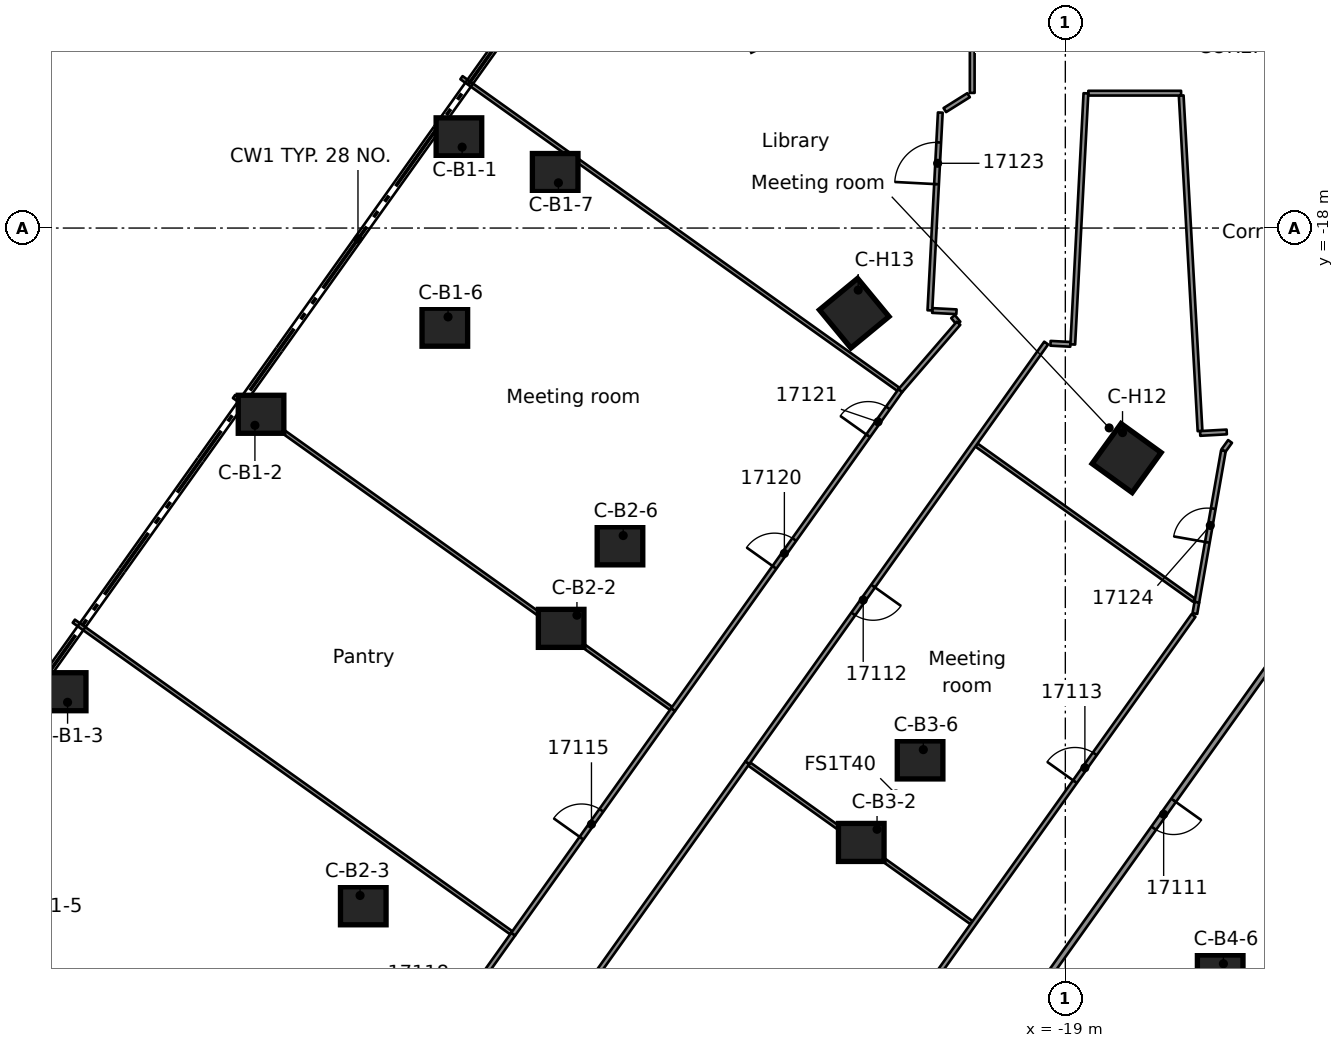
"""IFC4 building model, lengths in metres.
Left out: names, types, materials, properties, quantities, classifications, styles, units other than length and angle.
Written with IfcOpenShell. Run it as: python <this file> out.ifc"""

import sys

from ifc_helpers import new_model, si_unit, direction, frame, frame_2d, origin, origin_2d, place, context, subcontext, project, spatial, rectangle, extrude, element, fill, save


model = new_model("IFC4")
c1 = context("Model", 3, precision=1e-05, world=origin(), true_north=direction((0.0, 1.0)))
c2 = subcontext(c1, "Body", "Model", "MODEL_VIEW")
j1 = project(units=[si_unit("LENGTHUNIT", "METRE"), si_unit("PLANEANGLEUNIT", "RADIAN")], contexts=[c1])
p1 = place(None, origin())
s1 = spatial("IfcSite", under=j1, at=p1, CompositionType="ELEMENT")
p2 = place(p1, origin())
s2 = spatial("IfcBuilding", under=s1, at=p2, CompositionType="ELEMENT")
p3 = place(p2, frame((0.0, 0.0, 84.2)))
s3 = spatial("IfcBuildingStorey", under=s2, at=p3, CompositionType="ELEMENT", Elevation=84.2)
for number, where, z_axis, x_axis in (
    (1, (-34.957, -15.6, 0.0), (0.0, 0.0, 1.0), (1.0, 0.0, 0.0)),
    (2, (-40.164, -22.9, 0.0), (0.0, 0.0, 1.0), (1.0, 0.0, 0.0)),
    (3, (-45.371, -30.2, 0.0), (0.0, 0.0, 1.0), (1.0, 0.0, 0.0)),
    (4, (-35.328, -20.609, 0.0), (0.0, 0.0, 1.0), (1.0, 0.0, 0.0)),
    (5, (-32.424, -16.539, 0.0), (0.0, 0.0, 1.0), (1.0, 0.0, 0.0)),
    (6, (-32.267, -28.533, 0.0), (0.0, 0.0, 1.0), (1.0, 0.0, 0.0)),
    (7, (-37.474, -35.833, 0.0), (0.0, 0.0, 1.0), (1.0, 0.0, 0.0)),
    (8, (-30.719, -26.362, 0.0), (0.0, 0.0, 1.0), (1.0, 0.0, 0.0)),
    (9, (-24.37, -34.166, 0.0), (0.0, 0.0, 1.0), (1.0, 0.0, 0.0)),
    (10, (-22.822, -31.995, 0.0), (0.0, 0.0, 1.0), (1.0, 0.0, 0.0)),
    (11, (-14.925, -37.628, 0.0), (0.0, 0.0, 1.0), (1.0, 0.0, 0.0)),
):
    element("IfcColumn", number, at=place(p3, frame(where, z_axis=z_axis, x_axis=x_axis)), inside=s3, PredefinedType="COLUMN", context=c2, shape_type="SweptSolid", body=[
        extrude(rectangle(XDim=1.2, YDim=1.0, at=origin_2d()), origin(), (0.0, 0.0, 1.0), 3.5),
    ])
for number, where, z_axis, x_axis in (
    (12, (-17.387, -24.053, 0.0), (0.0, 0.0, 1.0), (-0.586, -0.81, 0.0)),
    (13, (-24.555, -20.241, 0.0), (0.0, 0.0, 1.0), (-0.772, -0.636, 0.0)),
):
    element("IfcColumn", number, at=place(p3, frame(where, z_axis=z_axis, x_axis=x_axis)), inside=s3, PredefinedType="COLUMN", context=c2, shape_type="SweptSolid", body=[
        extrude(rectangle(XDim=1.3, YDim=1.3, at=origin_2d()), origin(), (0.0, 0.0, 1.0), 3.5),
    ])
p4 = place(p3, frame((-15.455, -23.341, 0.0), z_axis=(0.0, 0.0, 1.0), x_axis=(-0.056078648391, 0.998426354417, 0.0)))
e14 = element("IfcWall", 14, at=p4, inside=s3, PredefinedType="PARTITIONING", context=c2, shape_type="SweptSolid", body=[
    extrude(rectangle(XDim=8.842, YDim=0.125, at=frame_2d((4.421, 0.0))), origin(), (0.0, 0.0, 1.0), 3.08),
])
p5 = place(p3, frame((-21.955, -20.33, 0.0), z_axis=(0.0, 0.0, 1.0), x_axis=(0.635933908165, -0.771743522451, 0.0)))
e15 = element("IfcWall", 15, at=p5, inside=s3, PredefinedType="PARTITIONING", context=c2, shape_type="SweptSolid", body=[
    extrude(rectangle(XDim=0.227, YDim=0.125, at=frame_2d((0.113, 0.0))), origin(), (0.0, 0.0, 1.0), 3.08),
])
p6 = place(p3, frame((-45.091, -28.344, 0.0), z_axis=(0.0, 0.0, 1.0), x_axis=(0.814507796702, -0.580152608468, 0.0)))
e16 = element("IfcWall", 16, at=p6, inside=s3, PredefinedType="PARTITIONING", context=c2, shape_type="SweptSolid", body=[
    extrude(rectangle(XDim=14.132, YDim=0.1, at=frame_2d((7.066, 0.0))), origin(), (0.0, 0.0, 1.0), 3.08),
])
p7 = place(p3, frame((-40.875, -22.433, 0.0), z_axis=(0.0, 0.0, 1.0), x_axis=(0.814073113892, -0.580762399987, 0.0)))
e17 = element("IfcWall", 17, at=p7, inside=s3, PredefinedType="PARTITIONING", context=c2, shape_type="SweptSolid", body=[
    extrude(rectangle(XDim=14.128, YDim=0.1, at=frame_2d((7.064, 0.0))), origin(), (0.0, 0.0, 1.0), 3.08),
])
p8 = place(p3, frame((-27.317, -32.104, 0.0), z_axis=(0.0, 0.0, 1.0), x_axis=(0.814075490276, -0.58075906892, 0.0)))
e18 = element("IfcWall", 18, at=p8, inside=s3, PredefinedType="PARTITIONING", context=c2, shape_type="SweptSolid", body=[
    extrude(rectangle(XDim=7.184, YDim=0.1, at=frame_2d((3.592, 0.0))), origin(), (0.0, 0.0, 1.0), 3.08),
])
p9 = place(p3, frame((-34.89, -14.043, 0.0), z_axis=(0.0, 0.0, 1.0), x_axis=(0.814114134431, -0.580704895898, 0.0)))
e19 = element("IfcWall", 19, at=p9, inside=s3, PredefinedType="PARTITIONING", context=c2, shape_type="SweptSolid", body=[
    extrude(rectangle(XDim=14.121, YDim=0.1, at=frame_2d((7.06, 0.0))), origin(), (0.0, 0.0, 1.0), 3.08),
])
p10 = place(p3, frame((-21.338, -23.709, 0.0), z_axis=(0.0, 0.0, 1.0), x_axis=(0.814120490143, -0.580695985461, 0.0)))
e20 = element("IfcWall", 20, at=p10, inside=s3, PredefinedType="PARTITIONING", context=c2, shape_type="SweptSolid", body=[
    extrude(rectangle(XDim=7.03, YDim=0.1, at=frame_2d((3.515, 0.0))), origin(), (0.0, 0.0, 1.0), 3.08),
])
p11 = place(p3, frame((-19.39, -21.032, 0.0), z_axis=(0.0, 0.0, 1.0), x_axis=(0.998561899865, -0.053610932999, 0.0)))
e21 = element("IfcWall", 21, at=p11, inside=s3, PredefinedType="PARTITIONING", context=c2, shape_type="SweptSolid", body=[
    extrude(rectangle(XDim=0.524, YDim=0.125, at=frame_2d((0.262, 0.0))), origin(), (0.0, 0.0, 1.0), 3.08),
])
p12 = place(p3, frame((-22.501, -20.169, 0.0), z_axis=(0.0, 0.0, 1.0), x_axis=(0.998579445261, -0.05328312587, 0.0)))
e22 = element("IfcWall", 22, at=p12, inside=s3, PredefinedType="PARTITIONING", context=c2, shape_type="SweptSolid", body=[
    extrude(rectangle(XDim=0.637, YDim=0.125, at=frame_2d((0.318, 0.0))), origin(), (0.0, 0.0, 1.0), 3.08),
])
p13 = place(p3, frame((-18.395, -14.451, 0.0), z_axis=(0.0, 0.0, 1.0), x_axis=(1.0, 0.0, 0.0)))
e23 = element("IfcWall", 23, at=p13, inside=s3, PredefinedType="PARTITIONING", context=c2, shape_type="SweptSolid", body=[
    extrude(rectangle(XDim=2.441, YDim=0.125, at=frame_2d((1.22, 0.0))), origin(), (0.0, 0.0, 1.0), 3.08),
])
p14 = place(p3, frame((-15.452, -23.404, 0.0), z_axis=(0.0, 0.0, 1.0), x_axis=(0.99844205744, 0.055798368561, 0.0)))
e24 = element("IfcWall", 24, at=p14, inside=s3, PredefinedType="PARTITIONING", context=c2, shape_type="SweptSolid", body=[
    extrude(rectangle(XDim=0.7, YDim=0.125, at=frame_2d((0.35, 0.0))), origin(), (0.0, 0.0, 1.0), 3.08),
])
p15 = place(p3, frame((-22.171, -14.896, 0.0), z_axis=(0.0, 0.0, 1.0), x_axis=(0.847104786715, 0.53142589354, 0.0)))
e25 = element("IfcWall", 25, at=p15, inside=s3, PredefinedType="PARTITIONING", context=c2, shape_type="SweptSolid", body=[
    extrude(rectangle(XDim=0.738, YDim=0.125, at=frame_2d((0.369, 0.0))), origin(), (0.0, 0.0, 1.0), 3.08),
])
p16 = place(p3, frame((-21.811, -20.505, 0.0), z_axis=(0.0, 0.0, 1.0), x_axis=(-0.65355749983, -0.756876868728, 0.0)))
e26 = element("IfcWall", 26, at=p16, inside=s3, PredefinedType="PARTITIONING", context=c2, shape_type="SweptSolid", body=[
    extrude(rectangle(XDim=2.344, YDim=0.125, at=frame_2d((1.172, 0.0))), origin(), (0.0, 0.0, 1.0), 3.08),
])
p17 = place(p3, frame((-14.84, -23.857, 0.0), z_axis=(0.0, 0.0, 1.0), x_axis=(0.586176879317, 0.810183106559, 0.0)))
e27 = element("IfcWall", 27, at=p17, inside=s3, PredefinedType="PARTITIONING", context=c2, shape_type="SweptSolid", body=[
    extrude(rectangle(XDim=0.299, YDim=0.125, at=frame_2d((0.149, 0.0))), origin(), (0.0, 0.0, 1.0), 3.08),
])
p18 = place(p3, frame((-13.48, -29.312, 0.0), z_axis=(0.0, 0.0, 1.0), x_axis=(-0.580603145907, -0.814186702767, 0.0)))
e28 = element("IfcWall", 28, at=p18, inside=s3, PredefinedType="PARTITIONING", context=c2, shape_type="SweptSolid", body=[
    extrude(rectangle(XDim=24.809, YDim=0.15, at=frame_2d((12.404, 0.0))), origin(), (0.0, 0.0, 1.0), 3.08),
])
p19 = place(p18, frame((4.601, 0.0, 0.0)))
e29 = element("IfcOpeningElement", 29, at=p19, cuts=e28, PredefinedType="OPENING", context=c2, shape_type="SweptSolid", body=[
    extrude(rectangle(XDim=0.9, YDim=2.1, at=frame_2d((0.45, 1.05))), frame((0.0, 0.085, 0.0), z_axis=(0.0, -1.0, 0.0), x_axis=(1.0, 0.0, 0.0)), (0.0, 0.0, 1.0), 0.17),
])
p20 = place(p18, frame((13.408, 0.0, 0.0)))
e30 = element("IfcOpeningElement", 30, at=p20, cuts=e28, PredefinedType="OPENING", context=c2, shape_type="SweptSolid", body=[
    extrude(rectangle(XDim=0.9, YDim=2.1, at=frame_2d((0.45, 1.05))), frame((0.0, 0.085, 0.0), z_axis=(0.0, -1.0, 0.0), x_axis=(1.0, 0.0, 0.0)), (0.0, 0.0, 1.0), 0.17),
])
p21 = place(p18, frame((19.4, 0.0, 0.0)))
e31 = element("IfcOpeningElement", 31, at=p21, cuts=e28, PredefinedType="OPENING", context=c2, shape_type="SweptSolid", body=[
    extrude(rectangle(XDim=0.9, YDim=2.1, at=frame_2d((0.45, 1.05))), frame((0.0, 0.085, 0.0), z_axis=(0.0, -1.0, 0.0), x_axis=(1.0, 0.0, 0.0)), (0.0, 0.0, 1.0), 0.17),
])
p22 = place(p3, frame((-28.27, -45.918, 0.0), z_axis=(0.0, 0.0, 1.0), x_axis=(0.580725722128, 0.814099278749, 0.0)))
e32 = element("IfcWall", 32, at=p22, inside=s3, PredefinedType="PARTITIONING", context=c2, shape_type="SweptSolid", body=[
    extrude(rectangle(XDim=21.771, YDim=0.125, at=frame_2d((10.886, 0.0))), origin(), (0.0, 0.0, 1.0), 3.08),
])
p23 = place(p22, frame((16.399, 0.0, 0.0)))
e33 = element("IfcOpeningElement", 33, at=p23, cuts=e32, PredefinedType="OPENING", context=c2, shape_type="SweptSolid", body=[
    extrude(rectangle(XDim=0.9, YDim=2.1, at=frame_2d((0.45, 1.05))), frame((0.0, 0.073, 0.0), z_axis=(0.0, -1.0, 0.0), x_axis=(1.0, 0.0, 0.0)), (0.0, 0.0, 1.0), 0.145),
])
p24 = place(p22, frame((5.35, 0.0, 0.0)))
e34 = element("IfcOpeningElement", 34, at=p24, cuts=e32, PredefinedType="OPENING", context=c2, shape_type="SweptSolid", body=[
    extrude(rectangle(XDim=0.9, YDim=2.1, at=frame_2d((0.45, 1.05))), frame((0.0, 0.073, 0.0), z_axis=(0.0, -1.0, 0.0), x_axis=(1.0, 0.0, 0.0)), (0.0, 0.0, 1.0), 0.145),
])
p25 = place(p3, frame((-34.214, -41.679, 0.0), z_axis=(0.0, 0.0, 1.0), x_axis=(0.580188672361, 0.81448210813, 0.0)))
e35 = element("IfcWall", 35, at=p25, inside=s3, PredefinedType="PARTITIONING", context=c2, shape_type="SweptSolid", body=[
    extrude(rectangle(XDim=11.8, YDim=0.125, at=frame_2d((5.9, 0.0))), origin(), (0.0, 0.0, 1.0), 3.08),
])
p26 = place(p3, frame((-19.504, -21.026, 0.0), z_axis=(0.0, 0.0, 1.0), x_axis=(-0.580099628217, -0.814545530552, 0.0)))
e36 = element("IfcWall", 36, at=p26, inside=s3, PredefinedType="PARTITIONING", context=c2, shape_type="SweptSolid", body=[
    extrude(rectangle(XDim=13.556, YDim=0.125, at=frame_2d((6.778, 0.0))), origin(), (0.0, 0.0, 1.0), 3.08),
])
p27 = place(p26, frame((7.85, 0.0, 0.0)))
e37 = element("IfcOpeningElement", 37, at=p27, cuts=e36, PredefinedType="OPENING", context=c2, shape_type="SweptSolid", body=[
    extrude(rectangle(XDim=0.9, YDim=2.1, at=frame_2d((0.45, 1.05))), frame((0.0, 0.073, 0.0), z_axis=(0.0, -1.0, 0.0), x_axis=(1.0, 0.0, 0.0)), (0.0, 0.0, 1.0), 0.145),
])
p28 = place(p3, frame((-37.736, -42.485, 0.0), z_axis=(0.0, 0.0, 1.0), x_axis=(0.580183503548, 0.814485790061, 0.0)))
e38 = element("IfcWall", 38, at=p28, inside=s3, PredefinedType="PARTITIONING", context=c2, shape_type="SweptSolid", body=[
    extrude(rectangle(XDim=7.251, YDim=0.125, at=frame_2d((3.625, 0.0))), origin(), (0.0, 0.0, 1.0), 3.08),
])
p29 = place(p28, frame((3.1, 0.0, 0.0)))
e39 = element("IfcOpeningElement", 39, at=p29, cuts=e38, PredefinedType="OPENING", context=c2, shape_type="SweptSolid", body=[
    extrude(rectangle(XDim=0.9, YDim=2.1, at=frame_2d((0.45, 1.05))), frame((0.0, 0.073, 0.0), z_axis=(0.0, -1.0, 0.0), x_axis=(1.0, 0.0, 0.0)), (0.0, 0.0, 1.0), 0.145),
])
p30 = place(p3, frame((-29.323, -30.674, 0.0), z_axis=(0.0, 0.0, 1.0), x_axis=(0.580180127153, 0.814488195161, 0.0)))
e40 = element("IfcWall", 40, at=p30, inside=s3, PredefinedType="PARTITIONING", context=c2, shape_type="SweptSolid", body=[
    extrude(rectangle(XDim=10.307, YDim=0.125, at=frame_2d((5.154, 0.0))), origin(), (0.0, 0.0, 1.0), 3.08),
])
p31 = place(p30, frame((4.6, 0.0, 0.0)))
e41 = element("IfcOpeningElement", 41, at=p31, cuts=e40, PredefinedType="OPENING", context=c2, shape_type="SweptSolid", body=[
    extrude(rectangle(XDim=0.9, YDim=2.1, at=frame_2d((0.45, 1.05))), frame((0.0, 0.073, 0.0), z_axis=(0.0, -1.0, 0.0), x_axis=(1.0, 0.0, 0.0)), (0.0, 0.0, 1.0), 0.145),
])
p32 = place(p30, frame((8.85, 0.0, 0.0)))
e42 = element("IfcOpeningElement", 42, at=p32, cuts=e40, PredefinedType="OPENING", context=c2, shape_type="SweptSolid", body=[
    extrude(rectangle(XDim=0.9, YDim=2.1, at=frame_2d((0.45, 1.05))), frame((0.0, 0.073, 0.0), z_axis=(0.0, -1.0, 0.0), x_axis=(1.0, 0.0, 0.0)), (0.0, 0.0, 1.0), 0.145),
])
p33 = place(p3, frame((-33.529, -36.579, 0.0), z_axis=(0.0, 0.0, 1.0), x_axis=(0.580157797449, 0.814504100702, 0.0)))
e43 = element("IfcWall", 43, at=p33, inside=s3, PredefinedType="PARTITIONING", context=c2, shape_type="SweptSolid", body=[
    extrude(rectangle(XDim=7.25, YDim=0.125, at=frame_2d((3.625, 0.0))), origin(), (0.0, 0.0, 1.0), 3.08),
])
p34 = place(p33, frame((3.1, 0.0, 0.0)))
e44 = element("IfcOpeningElement", 44, at=p34, cuts=e43, PredefinedType="OPENING", context=c2, shape_type="SweptSolid", body=[
    extrude(rectangle(XDim=0.9, YDim=2.1, at=frame_2d((0.45, 1.05))), frame((0.0, 0.073, 0.0), z_axis=(0.0, -1.0, 0.0), x_axis=(1.0, 0.0, 0.0)), (0.0, 0.0, 1.0), 0.145),
])
p35 = place(p3, frame((-15.539, -27.845, 0.0), z_axis=(0.0, 0.0, 1.0), x_axis=(0.172636295387, 0.984985639243, 0.0)))
e45 = element("IfcWall", 45, at=p35, inside=s3, PredefinedType="PARTITIONING", context=c2, shape_type="SweptSolid", body=[
    extrude(rectangle(XDim=4.049, YDim=0.125, at=frame_2d((2.024, 0.0))), origin(), (0.0, 0.0, 1.0), 3.08),
])
p36 = place(p35, frame((1.6, 0.0, 0.0)))
e46 = element("IfcOpeningElement", 46, at=p36, cuts=e45, PredefinedType="OPENING", context=c2, shape_type="SweptSolid", body=[
    extrude(rectangle(XDim=0.9, YDim=2.1, at=frame_2d((0.45, 1.05))), frame((0.0, 0.073, 0.0), z_axis=(0.0, -1.0, 0.0), x_axis=(1.0, 0.0, 0.0)), (0.0, 0.0, 1.0), 0.145),
])
p37 = place(p3, frame((-15.591, -28.143, 0.0), z_axis=(0.0, 0.0, 1.0), x_axis=(0.171851888702, 0.985122798614, 0.0)))
e47 = element("IfcWall", 47, at=p37, inside=s3, PredefinedType="PARTITIONING", context=c2, shape_type="SweptSolid", body=[
    extrude(rectangle(XDim=0.302, YDim=0.125, at=frame_2d((0.151, 0.0))), origin(), (0.0, 0.0, 1.0), 3.08),
])
p38 = place(p3, frame((-18.804, -21.063, 0.0), z_axis=(0.0, 0.0, 1.0), x_axis=(0.052281905806, 0.998632365951, 0.0)))
e48 = element("IfcWall", 48, at=p38, inside=s3, PredefinedType="PARTITIONING", context=c2, shape_type="SweptSolid", body=[
    extrude(rectangle(XDim=6.617, YDim=0.125, at=frame_2d((3.309, 0.0))), origin(), (0.0, 0.0, 1.0), 3.08),
])
p39 = place(p3, frame((-22.564, -20.166, 0.0), z_axis=(0.0, 0.0, 1.0), x_axis=(0.052553916269, 0.998618088102, 0.0)))
e49 = element("IfcWall", 49, at=p39, inside=s3, PredefinedType="PARTITIONING", context=c2, shape_type="SweptSolid", body=[
    extrude(rectangle(XDim=5.212, YDim=0.125, at=frame_2d((2.606, 0.0))), origin(), (0.0, 0.0, 1.0), 3.08),
])
p40 = place(p39, frame((3.325, 0.0, 0.0)))
e50 = element("IfcOpeningElement", 50, at=p40, cuts=e49, PredefinedType="OPENING", context=c2, shape_type="SweptSolid", body=[
    extrude(rectangle(XDim=1.1, YDim=2.1, at=frame_2d((0.55, 1.05))), frame((0.0, 0.073, 0.0), z_axis=(0.0, -1.0, 0.0), x_axis=(1.0, 0.0, 0.0)), (0.0, 0.0, 1.0), 0.145),
])
p41 = place(p3, frame((-21.45, -14.444, 0.0), z_axis=(0.0, 0.0, 1.0), x_axis=(0.0, 1.0, 0.0)))
e51 = element("IfcWall", 51, at=p41, inside=s3, PredefinedType="PARTITIONING", context=c2, shape_type="SweptSolid", body=[
    extrude(rectangle(XDim=28.895, YDim=0.125, at=frame_2d((14.448, 0.0))), origin(), (0.0, 0.0, 1.0), 3.08),
])
p42 = place(p41, frame((11.044, 0.0, 0.0)))
e52 = element("IfcOpeningElement", 52, at=p42, cuts=e51, PredefinedType="OPENING", context=c2, shape_type="SweptSolid", body=[
    extrude(rectangle(XDim=0.9, YDim=2.1, at=frame_2d((0.45, 1.05))), frame((0.0, 0.073, 0.0), z_axis=(0.0, -1.0, 0.0), x_axis=(1.0, 0.0, 0.0)), (0.0, 0.0, 1.0), 0.145),
])
p43 = place(p41, frame((27.044, 0.0, 0.0)))
e53 = element("IfcOpeningElement", 53, at=p43, cuts=e51, PredefinedType="OPENING", context=c2, shape_type="SweptSolid", body=[
    extrude(rectangle(XDim=1.1, YDim=2.1, at=frame_2d((0.55, 1.05))), frame((0.0, 0.073, 0.0), z_axis=(0.0, -1.0, 0.0), x_axis=(1.0, 0.0, 0.0)), (0.0, 0.0, 1.0), 0.145),
])
p44 = place(p41, frame((22.795, 0.0, 0.0)))
e54 = element("IfcOpeningElement", 54, at=p44, cuts=e51, PredefinedType="OPENING", context=c2, shape_type="SweptSolid", body=[
    extrude(rectangle(XDim=1.1, YDim=2.1, at=frame_2d((0.55, 1.05))), frame((0.0, 0.073, 0.0), z_axis=(0.0, -1.0, 0.0), x_axis=(1.0, 0.0, 0.0)), (0.0, 0.0, 1.0), 0.145),
])
p45 = place(p19, origin())
e55 = element("IfcDoor", 55, at=p45, inside=s3, OperationType="SINGLE_SWING_LEFT", PredefinedType="DOOR", context=c2, shape_type="SweptSolid", body=[
    extrude(rectangle(XDim=0.9, YDim=2.1, at=frame_2d((0.45, 1.05))), frame((0.0, 0.025, 0.0), z_axis=(0.0, -1.0, 0.0), x_axis=(1.0, 0.0, 0.0)), (0.0, 0.0, 1.0), 0.05),
])
fill(e29, e55)
p46 = place(p27, origin())
e56 = element("IfcDoor", 56, at=p46, inside=s3, OperationType="SINGLE_SWING_RIGHT", PredefinedType="DOOR", context=c2, shape_type="SweptSolid", body=[
    extrude(rectangle(XDim=0.9, YDim=2.1, at=frame_2d((0.45, 1.05))), frame((0.0, 0.025, 0.0), z_axis=(0.0, -1.0, 0.0), x_axis=(1.0, 0.0, 0.0)), (0.0, 0.0, 1.0), 0.05),
])
fill(e37, e56)
p47 = place(p23, origin())
e57 = element("IfcDoor", 57, at=p47, inside=s3, OperationType="SINGLE_SWING_RIGHT", PredefinedType="DOOR", context=c2, shape_type="SweptSolid", body=[
    extrude(rectangle(XDim=0.9, YDim=2.1, at=frame_2d((0.45, 1.05))), frame((0.0, 0.025, 0.0), z_axis=(0.0, -1.0, 0.0), x_axis=(1.0, 0.0, 0.0)), (0.0, 0.0, 1.0), 0.05),
])
fill(e33, e57)
p48 = place(p34, origin())
e58 = element("IfcDoor", 58, at=p48, inside=s3, OperationType="SINGLE_SWING_LEFT", PredefinedType="DOOR", context=c2, shape_type="SweptSolid", body=[
    extrude(rectangle(XDim=0.9, YDim=2.1, at=frame_2d((0.45, 1.05))), frame((0.0, 0.025, 0.0), z_axis=(0.0, -1.0, 0.0), x_axis=(1.0, 0.0, 0.0)), (0.0, 0.0, 1.0), 0.05),
])
fill(e44, e58)
p49 = place(p31, origin())
e59 = element("IfcDoor", 59, at=p49, inside=s3, OperationType="SINGLE_SWING_LEFT", PredefinedType="DOOR", context=c2, shape_type="SweptSolid", body=[
    extrude(rectangle(XDim=0.9, YDim=2.1, at=frame_2d((0.45, 1.05))), frame((0.0, 0.025, 0.0), z_axis=(0.0, -1.0, 0.0), x_axis=(1.0, 0.0, 0.0)), (0.0, 0.0, 1.0), 0.05),
])
fill(e41, e59)
p50 = place(p32, origin())
e60 = element("IfcDoor", 60, at=p50, inside=s3, OperationType="SINGLE_SWING_RIGHT", PredefinedType="DOOR", context=c2, shape_type="SweptSolid", body=[
    extrude(rectangle(XDim=0.9, YDim=2.1, at=frame_2d((0.45, 1.05))), frame((0.0, 0.025, 0.0), z_axis=(0.0, -1.0, 0.0), x_axis=(1.0, 0.0, 0.0)), (0.0, 0.0, 1.0), 0.05),
])
fill(e42, e60)
p51 = place(p40, origin())
e61 = element("IfcDoor", 61, at=p51, inside=s3, OperationType="SINGLE_SWING_RIGHT", PredefinedType="DOOR", context=c2, shape_type="SweptSolid", body=[
    extrude(rectangle(XDim=1.1, YDim=2.1, at=frame_2d((0.55, 1.05))), frame((0.0, 0.025, 0.0), z_axis=(0.0, -1.0, 0.0), x_axis=(1.0, 0.0, 0.0)), (0.0, 0.0, 1.0), 0.05),
])
fill(e50, e61)
p52 = place(p36, origin())
e62 = element("IfcDoor", 62, at=p52, inside=s3, OperationType="SINGLE_SWING_RIGHT", PredefinedType="DOOR", context=c2, shape_type="SweptSolid", body=[
    extrude(rectangle(XDim=0.9, YDim=2.1, at=frame_2d((0.45, 1.05))), frame((0.0, 0.025, 0.0), z_axis=(0.0, -1.0, 0.0), x_axis=(1.0, 0.0, 0.0)), (0.0, 0.0, 1.0), 0.05),
])
fill(e46, e62)
save(model, sys.argv[1])
